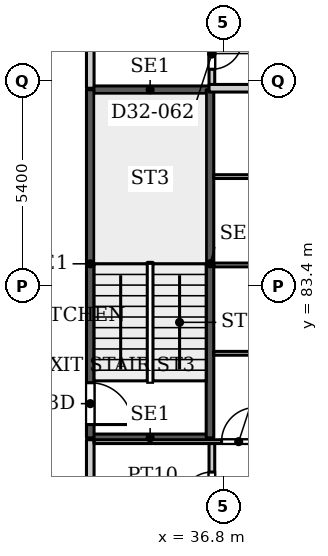
"""IFC4 building model, lengths in metres.
Left out: names, types, materials, properties, quantities, classifications, styles, units other than length and angle.
Written with IfcOpenShell. Run it as: python <this file> out.ifc"""

import sys

from ifc_helpers import new_model, si_unit, direction, frame, frame_2d, origin, place, context, subcontext, project, spatial, rectangle, extrude, source, transform, mapped, element, fill, save


model = new_model("IFC4")
c1 = context("Model", 3, precision=1e-05, world=origin(), true_north=direction((0.0, 1.0)))
c2 = subcontext(c1, "Body", "Model", "MODEL_VIEW")
j1 = project(units=[si_unit("LENGTHUNIT", "METRE"), si_unit("PLANEANGLEUNIT", "RADIAN")], contexts=[c1])
p1 = place(None, origin())
s1 = spatial("IfcSite", under=j1, at=p1, CompositionType="ELEMENT")
p2 = place(p1, origin())
s2 = spatial("IfcBuilding", under=s1, at=p2, CompositionType="ELEMENT")
p3 = place(p2, frame((0.0, 0.0, 140.9)))
s3 = spatial("IfcBuildingStorey", under=s2, at=p3, CompositionType="ELEMENT", Elevation=140.9)
for number, where, z_axis, x_axis in (
    (1, (33.3, 79.4, 0.0), (0.0, 0.0, 1.0), (1.0, 0.0, 0.0)),
    (2, (33.3, 88.56, 0.0), (0.0, 0.0, 1.0), (1.0, 0.0, 0.0)),
):
    element("IfcWall", number, at=place(p3, frame(where, z_axis=z_axis, x_axis=x_axis)), inside=s3, PredefinedType="SHEAR", context=c2, shape_type="SweptSolid", body=[
        extrude(rectangle(XDim=3.15, YDim=0.2, at=frame_2d((1.575, 0.0))), origin(), (0.0, 0.0, 1.0), 3.9),
    ])
p4 = place(p3, frame((33.3, 79.4, 0.0), z_axis=(0.0, 0.0, 1.0), x_axis=(0.0, 1.0, 0.0)))
e3 = element("IfcWall", 3, at=p4, inside=s3, PredefinedType="SHEAR", context=c2, shape_type="SweptSolid", body=[
    extrude(rectangle(XDim=9.16, YDim=0.2, at=frame_2d((4.58, 0.0))), origin(), (0.0, 0.0, 1.0), 3.9),
])
p5 = place(p4, frame((0.35, 0.0, 0.0)))
e4 = element("IfcOpeningElement", 4, at=p5, cuts=e3, PredefinedType="OPENING", context=c2, shape_type="SweptSolid", body=[
    extrude(rectangle(XDim=1.1, YDim=2.2, at=frame_2d((0.55, 1.1))), frame((0.0, 0.11, 0.0), z_axis=(0.0, -1.0, 0.0), x_axis=(1.0, 0.0, 0.0)), (0.0, 0.0, 1.0), 0.22),
])
p6 = place(p3, frame((36.45, 79.4, 0.0), z_axis=(0.0, 0.0, 1.0), x_axis=(0.0, 1.0, 0.0)))
e5 = element("IfcWall", 5, at=p6, inside=s3, PredefinedType="SHEAR", context=c2, shape_type="SweptSolid", body=[
    extrude(rectangle(XDim=9.16, YDim=0.2, at=frame_2d((4.58, 0.0))), origin(), (0.0, 0.0, 1.0), 3.9),
])
p7 = place(p3, frame((33.3, 54.4, 0.0), z_axis=(0.0, 0.0, 1.0), x_axis=(0.0, 1.0, 0.0)))
e6 = element("IfcWall", 6, at=p7, inside=s3, PredefinedType="PARTITIONING", context=c2, shape_type="SweptSolid", body=[
    extrude(rectangle(XDim=24.95, YDim=0.2, at=frame_2d((12.475, 0.0))), origin(), (0.0, 0.0, 1.0), 3.6),
])
p8 = place(p7, frame((11.5, 0.0, 0.0)))
e7 = element("IfcOpeningElement", 7, at=p8, cuts=e6, PredefinedType="OPENING", context=c2, shape_type="SweptSolid", body=[
    extrude(rectangle(XDim=1.0, YDim=2.1, at=frame_2d((0.5, 1.05))), frame((0.0, 0.11, 0.0), z_axis=(0.0, -1.0, 0.0), x_axis=(1.0, 0.0, 0.0)), (0.0, 0.0, 1.0), 0.22),
])
p9 = place(p7, frame((18.7, 0.0, 0.0)))
e8 = element("IfcOpeningElement", 8, at=p9, cuts=e6, PredefinedType="OPENING", context=c2, shape_type="SweptSolid", body=[
    extrude(rectangle(XDim=1.0, YDim=2.1, at=frame_2d((0.5, 1.05))), frame((0.0, 0.11, 0.0), z_axis=(0.0, -1.0, 0.0), x_axis=(1.0, 0.0, 0.0)), (0.0, 0.0, 1.0), 0.22),
])
p10 = place(p3, frame((33.3, 88.6, 0.0), z_axis=(0.0, 0.0, 1.0), x_axis=(0.0, 1.0, 0.0)))
e9 = element("IfcWall", 9, at=p10, inside=s3, PredefinedType="PARTITIONING", context=c2, shape_type="SweptSolid", body=[
    extrude(rectangle(XDim=5.5, YDim=0.2, at=frame_2d((2.75, 0.0))), origin(), (0.0, 0.0, 1.0), 3.6),
])
p11 = place(p10, frame((2.2, 0.0, 0.0)))
e10 = element("IfcOpeningElement", 10, at=p11, cuts=e9, PredefinedType="OPENING", context=c2, shape_type="SweptSolid", body=[
    extrude(rectangle(XDim=1.0, YDim=2.1, at=frame_2d((0.5, 1.05))), frame((0.0, 0.11, 0.0), z_axis=(0.0, -1.0, 0.0), x_axis=(1.0, 0.0, 0.0)), (0.0, 0.0, 1.0), 0.22),
])
p12 = place(p3, frame((33.4, 79.3, 0.0), z_axis=(0.0, 0.0, 1.0), x_axis=(1.0, 0.0, 0.0)))
e11 = element("IfcWall", 11, at=p12, inside=s3, PredefinedType="PARTITIONING", context=c2, shape_type="SweptSolid", body=[
    extrude(rectangle(XDim=12.5, YDim=0.1, at=frame_2d((6.25, 0.0))), origin(), (0.0, 0.0, 1.0), 3.6),
])
p13 = place(p12, frame((3.355, 0.0, 0.0)))
e12 = element("IfcOpeningElement", 12, at=p13, cuts=e11, PredefinedType="OPENING", context=c2, shape_type="SweptSolid", body=[
    extrude(rectangle(XDim=0.9, YDim=2.1, at=frame_2d((0.45, 1.05))), frame((0.0, 0.06, 0.0), z_axis=(0.0, -1.0, 0.0), x_axis=(1.0, 0.0, 0.0)), (0.0, 0.0, 1.0), 0.12),
])
p14 = place(p3, frame((36.425, 88.6, 0.0), z_axis=(0.0, 0.0, 1.0), x_axis=(1.0, 0.0, 0.0)))
e13 = element("IfcWall", 13, at=p14, inside=s3, PredefinedType="PARTITIONING", context=c2, shape_type="SweptSolid", body=[
    extrude(rectangle(XDim=9.475, YDim=0.2, at=frame_2d((4.737, 0.0))), origin(), (0.0, 0.0, 1.0), 2.5),
])
p15 = place(p3, frame((36.5, 74.425, 0.0), z_axis=(0.0, 0.0, 1.0), x_axis=(0.0, 1.0, 0.0)))
e14 = element("IfcWall", 14, at=p15, inside=s3, PredefinedType="PARTITIONING", context=c2, shape_type="SweptSolid", body=[
    extrude(rectangle(XDim=4.825, YDim=0.15, at=frame_2d((2.413, 0.0))), origin(), (0.0, 0.0, 1.0), 3.6),
])
p16 = place(p15, frame((0.875, 0.0, 0.0)))
e15 = element("IfcOpeningElement", 15, at=p16, cuts=e14, PredefinedType="OPENING", context=c2, shape_type="SweptSolid", body=[
    extrude(rectangle(XDim=0.8, YDim=2.1, at=frame_2d((0.4, 1.05))), frame((0.0, 0.085, 0.0), z_axis=(0.0, -1.0, 0.0), x_axis=(1.0, 0.0, 0.0)), (0.0, 0.0, 1.0), 0.17),
])
p17 = place(p15, frame((3.275, 0.0, 0.0)))
e16 = element("IfcOpeningElement", 16, at=p17, cuts=e14, PredefinedType="OPENING", context=c2, shape_type="SweptSolid", body=[
    extrude(rectangle(XDim=0.8, YDim=2.1, at=frame_2d((0.4, 1.05))), frame((0.0, 0.085, 0.0), z_axis=(0.0, -1.0, 0.0), x_axis=(1.0, 0.0, 0.0)), (0.0, 0.0, 1.0), 0.17),
])
p18 = place(p3, frame((36.5, 88.7, 0.0), z_axis=(0.0, 0.0, 1.0), x_axis=(0.0, 1.0, 0.0)))
e17 = element("IfcWall", 17, at=p18, inside=s3, PredefinedType="PARTITIONING", context=c2, shape_type="SweptSolid", body=[
    extrude(rectangle(XDim=1.625, YDim=0.15, at=frame_2d((0.812, 0.0))), origin(), (0.0, 0.0, 1.0), 3.6),
])
p19 = place(p18, frame((0.4, 0.0, 0.0)))
e18 = element("IfcOpeningElement", 18, at=p19, cuts=e17, PredefinedType="OPENING", context=c2, shape_type="SweptSolid", body=[
    extrude(rectangle(XDim=0.8, YDim=2.1, at=frame_2d((0.4, 1.05))), frame((0.0, 0.085, 0.0), z_axis=(0.0, -1.0, 0.0), x_axis=(1.0, 0.0, 0.0)), (0.0, 0.0, 1.0), 0.17),
])
p20 = place(p3, frame((36.549, 81.625, 0.0), z_axis=(0.0, 0.0, 1.0), x_axis=(1.0, 0.0, 0.0)))
e19 = element("IfcWall", 19, at=p20, inside=s3, PredefinedType="PARTITIONING", context=c2, shape_type="SweptSolid", body=[
    extrude(rectangle(XDim=9.351, YDim=0.1, at=frame_2d((4.675, 0.0))), origin(), (0.0, 0.0, 1.0), 3.6),
])
p21 = place(p20, frame((4.176, 0.0, 0.0)))
e20 = element("IfcOpeningElement", 20, at=p21, cuts=e19, PredefinedType="OPENING", context=c2, shape_type="SweptSolid", body=[
    extrude(rectangle(XDim=0.9, YDim=2.1, at=frame_2d((0.45, 1.05))), frame((0.0, 0.06, 0.0), z_axis=(0.0, -1.0, 0.0), x_axis=(1.0, 0.0, 0.0)), (0.0, 0.0, 1.0), 0.12),
])
p22 = place(p3, frame((36.549, 83.95, 0.0), z_axis=(0.0, 0.0, 1.0), x_axis=(1.0, 0.0, 0.0)))
e21 = element("IfcWall", 21, at=p22, inside=s3, PredefinedType="PARTITIONING", context=c2, shape_type="SweptSolid", body=[
    extrude(rectangle(XDim=9.351, YDim=0.1, at=frame_2d((4.675, 0.0))), origin(), (0.0, 0.0, 1.0), 3.6),
])
p23 = place(p22, frame((4.176, 0.0, 0.0)))
e22 = element("IfcOpeningElement", 22, at=p23, cuts=e21, PredefinedType="OPENING", context=c2, shape_type="SweptSolid", body=[
    extrude(rectangle(XDim=0.9, YDim=2.1, at=frame_2d((0.45, 1.05))), frame((0.0, 0.06, 0.0), z_axis=(0.0, -1.0, 0.0), x_axis=(1.0, 0.0, 0.0)), (0.0, 0.0, 1.0), 0.12),
])
p24 = place(p3, frame((36.549, 86.275, 0.0), z_axis=(0.0, 0.0, 1.0), x_axis=(1.0, 0.0, 0.0)))
e23 = element("IfcWall", 23, at=p24, inside=s3, PredefinedType="PARTITIONING", context=c2, shape_type="SweptSolid", body=[
    extrude(rectangle(XDim=9.351, YDim=0.1, at=frame_2d((4.675, 0.0))), origin(), (0.0, 0.0, 1.0), 3.6),
])
p25 = place(p24, frame((4.176, 0.0, 0.0)))
e24 = element("IfcOpeningElement", 24, at=p25, cuts=e23, PredefinedType="OPENING", context=c2, shape_type="SweptSolid", body=[
    extrude(rectangle(XDim=0.9, YDim=2.1, at=frame_2d((0.45, 1.05))), frame((0.0, 0.06, 0.0), z_axis=(0.0, -1.0, 0.0), x_axis=(1.0, 0.0, 0.0)), (0.0, 0.0, 1.0), 0.12),
])
m1 = source(origin(), c2, "Body", "SweptSolid", [
    extrude(rectangle(XDim=1.1, YDim=2.2, at=frame_2d((0.55, 1.1))), frame((0.0, 0.025, 0.0), z_axis=(0.0, -1.0, 0.0), x_axis=(1.0, 0.0, 0.0)), (0.0, 0.0, 1.0), 0.05),
])
p26 = place(p5, origin())
e25 = element("IfcDoor", 25, at=p26, inside=s3, OperationType="SINGLE_SWING_RIGHT", PredefinedType="DOOR", context=c2, shape_type="MappedRepresentation", body=[
    mapped(m1, transform((0.0, 0.0, 0.0), x_axis=(1.0, 0.0, 0.0), y_axis=(0.0, 1.0, 0.0), z_axis=(0.0, 0.0, 1.0), scale=1.0)),
])
fill(e4, e25)
m2 = source(origin(), c2, "Body", "SweptSolid", [
    extrude(rectangle(XDim=0.8, YDim=2.1, at=frame_2d((0.4, 1.05))), frame((0.0, 0.025, 0.0), z_axis=(0.0, -1.0, 0.0), x_axis=(1.0, 0.0, 0.0)), (0.0, 0.0, 1.0), 0.05),
])
p27 = place(p17, origin())
e26 = element("IfcDoor", 26, at=p27, inside=s3, OperationType="SINGLE_SWING_LEFT", PredefinedType="DOOR", context=c2, shape_type="MappedRepresentation", body=[
    mapped(m2, transform((0.0, 0.0, 0.0), x_axis=(1.0, 0.0, 0.0), y_axis=(0.0, 1.0, 0.0), z_axis=(0.0, 0.0, 1.0), scale=1.0)),
])
fill(e16, e26)
m3 = source(origin(), c2, "Body", "SweptSolid", [
    extrude(rectangle(XDim=0.9, YDim=2.1, at=frame_2d((0.45, 1.05))), frame((0.0, 0.025, 0.0), z_axis=(0.0, -1.0, 0.0), x_axis=(1.0, 0.0, 0.0)), (0.0, 0.0, 1.0), 0.05),
])
p28 = place(p13, origin())
e27 = element("IfcDoor", 27, at=p28, inside=s3, OperationType="SINGLE_SWING_LEFT", PredefinedType="DOOR", context=c2, shape_type="MappedRepresentation", body=[
    mapped(m3, transform((0.0, 0.0, 0.0), x_axis=(1.0, 0.0, 0.0), y_axis=(0.0, 1.0, 0.0), z_axis=(0.0, 0.0, 1.0), scale=1.0)),
])
fill(e12, e27)
p29 = place(p19, origin())
e28 = element("IfcDoor", 28, at=p29, inside=s3, OperationType="SINGLE_SWING_RIGHT", PredefinedType="DOOR", context=c2, shape_type="MappedRepresentation", body=[
    mapped(m2, transform((0.0, 0.0, 0.0), x_axis=(1.0, 0.0, 0.0), y_axis=(0.0, 1.0, 0.0), z_axis=(0.0, 0.0, 1.0), scale=1.0)),
])
fill(e18, e28)
save(model, sys.argv[1])
